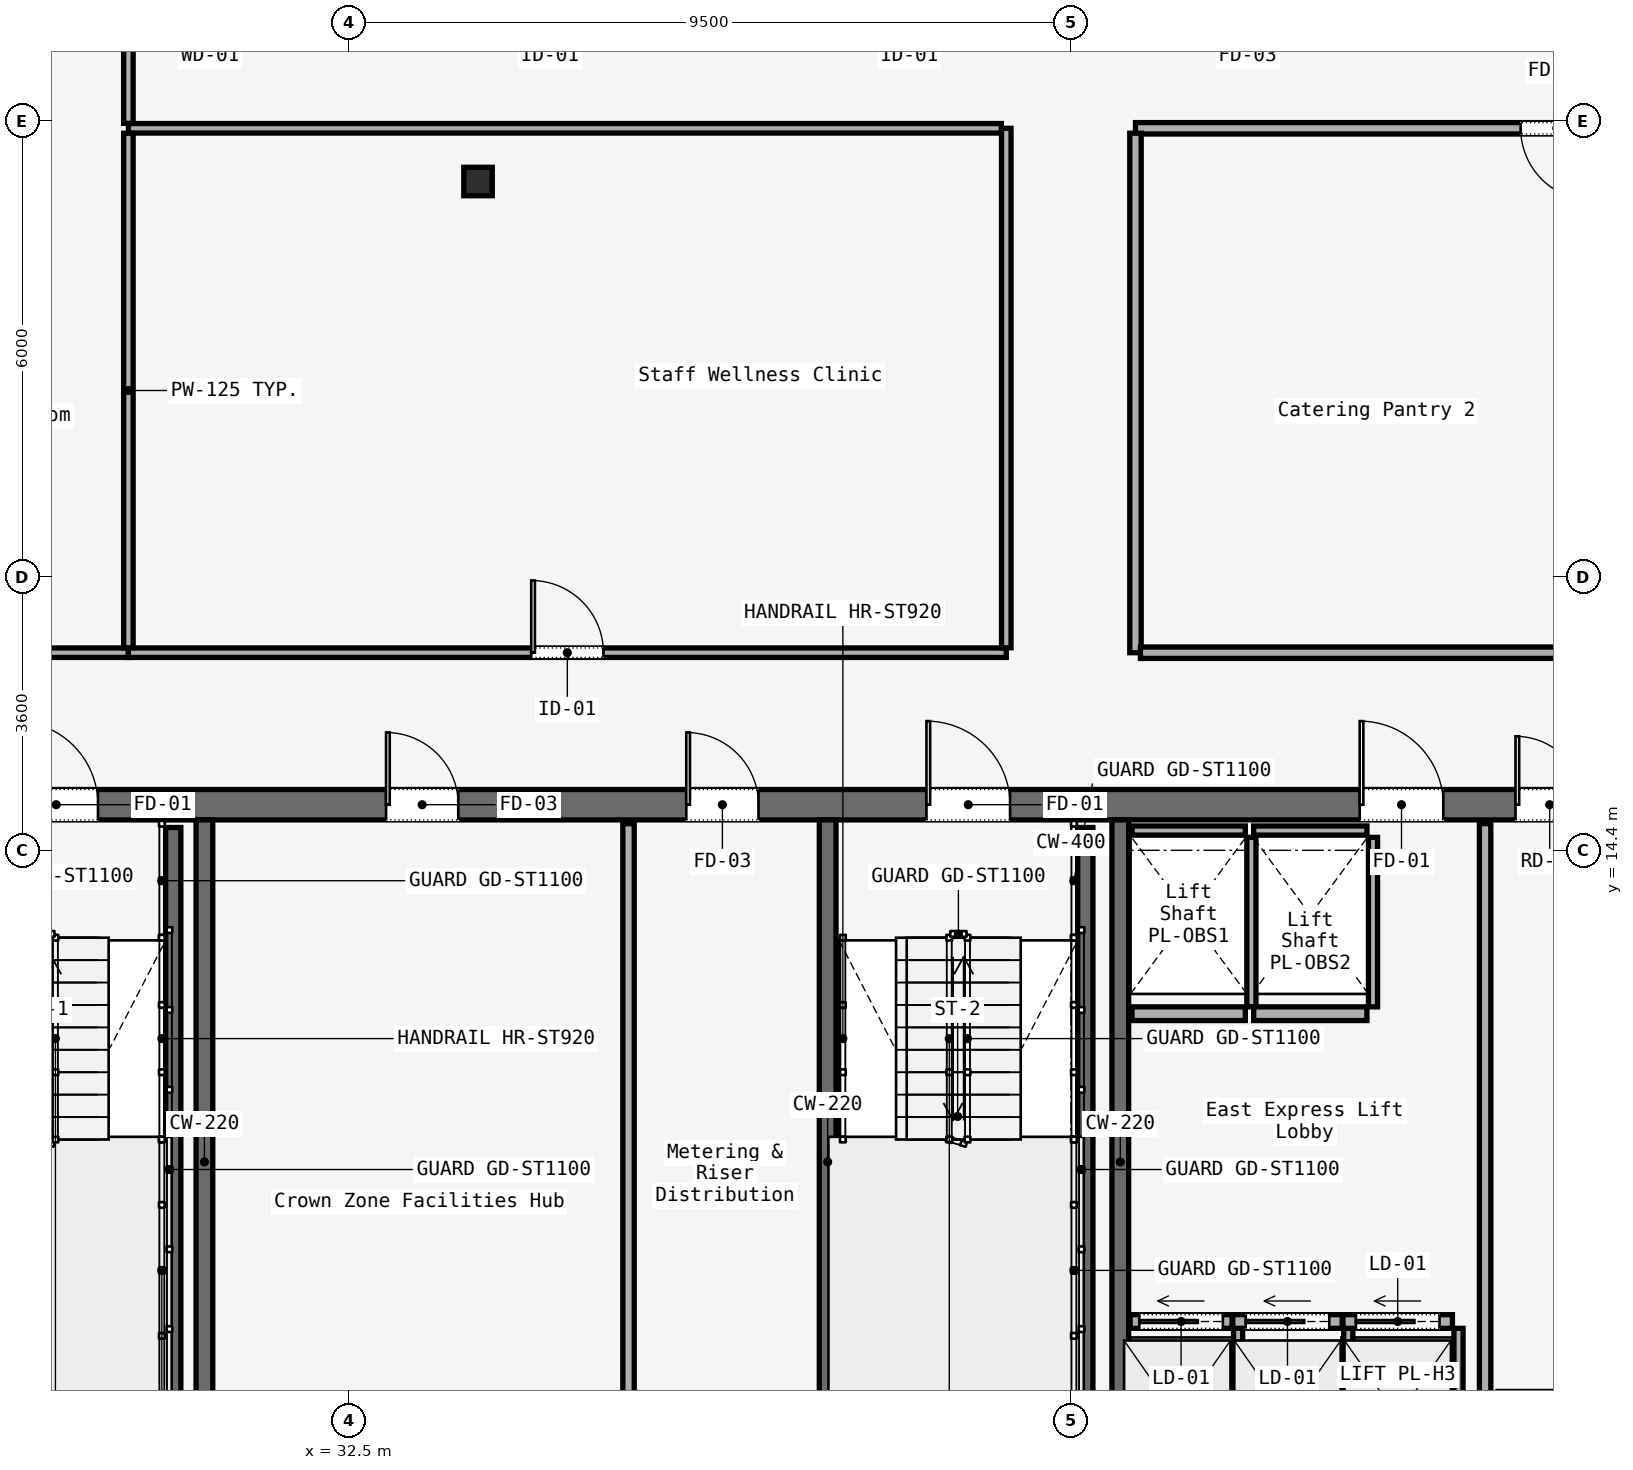
"""IFC4 building model, lengths in metres.
Left out: names, types, materials, properties, quantities, classifications, styles, units other than length and angle.
Written with IfcOpenShell. Run it as: python <this file> out.ifc"""

import sys

from ifc_helpers import new_model, si_unit, direction, frame, frame_2d, origin, origin_2d, place, context, subcontext, project, spatial, rectangle, i_section, extrude, element, fill, save


model = new_model("IFC4")
c1 = context("Model", 3, precision=1e-05, world=origin(), true_north=direction((0.0, 1.0)))
c2 = subcontext(c1, "Body", "Model", "MODEL_VIEW")
j1 = project(units=[si_unit("LENGTHUNIT", "METRE"), si_unit("PLANEANGLEUNIT", "RADIAN")], contexts=[c1])
p1 = place(None, origin())
s1 = spatial("IfcSite", under=j1, at=p1, CompositionType="ELEMENT")
p2 = place(p1, origin())
s2 = spatial("IfcBuilding", under=s1, at=p2, CompositionType="ELEMENT")
p3 = place(p2, frame((0.0, 0.0, 252.2)))
s3 = spatial("IfcBuildingStorey", under=s2, at=p3, CompositionType="ELEMENT", Elevation=252.2)
p4 = place(p3, frame((26.45, 15.0, 0.0), z_axis=(0.0, 0.0, 1.0), x_axis=(1.0, 0.0, 0.0)))
e1 = element("IfcWall", 1, at=p4, inside=s3, PredefinedType="SOLIDWALL", context=c2, shape_type="SweptSolid", body=[
    extrude(rectangle(XDim=31.1, YDim=0.4, at=frame_2d((15.55, 0.0))), origin(), (0.0, 0.0, 1.0), 3.58),
])
p5 = place(p4, frame((1.65, 0.0, 0.0)))
e2 = element("IfcOpeningElement", 2, at=p5, cuts=e1, PredefinedType="OPENING", context=c2, shape_type="SweptSolid", body=[
    extrude(rectangle(XDim=1.1, YDim=2.2, at=frame_2d((0.55, 1.1))), frame((0.0, 0.2, 0.0), z_axis=(0.0, -1.0, 0.0), x_axis=(1.0, 0.0, 0.0)), (0.0, 0.0, 1.0), 0.4),
])
p6 = place(p4, frame((13.65, 0.0, 0.0)))
e3 = element("IfcOpeningElement", 3, at=p6, cuts=e1, PredefinedType="OPENING", context=c2, shape_type="SweptSolid", body=[
    extrude(rectangle(XDim=1.1, YDim=2.2, at=frame_2d((0.55, 1.1))), frame((0.0, 0.2, 0.0), z_axis=(0.0, -1.0, 0.0), x_axis=(1.0, 0.0, 0.0)), (0.0, 0.0, 1.0), 0.4),
])
p7 = place(p4, frame((25.55, 0.0, 0.0)))
e4 = element("IfcOpeningElement", 4, at=p7, cuts=e1, PredefinedType="OPENING", context=c2, shape_type="SweptSolid", body=[
    extrude(rectangle(XDim=1.1, YDim=2.2, at=frame_2d((0.55, 1.1))), frame((0.0, 0.2, 0.0), z_axis=(0.0, -1.0, 0.0), x_axis=(1.0, 0.0, 0.0)), (0.0, 0.0, 1.0), 0.4),
])
p8 = place(p4, frame((19.35, 0.0, 0.0)))
e5 = element("IfcOpeningElement", 5, at=p8, cuts=e1, PredefinedType="OPENING", context=c2, shape_type="SweptSolid", body=[
    extrude(rectangle(XDim=1.1, YDim=2.2, at=frame_2d((0.55, 1.1))), frame((0.0, 0.2, 0.0), z_axis=(0.0, -1.0, 0.0), x_axis=(1.0, 0.0, 0.0)), (0.0, 0.0, 1.0), 0.4),
])
p9 = place(p4, frame((21.4, 0.0, 0.0)))
e6 = element("IfcOpeningElement", 6, at=p9, cuts=e1, PredefinedType="OPENING", context=c2, shape_type="SweptSolid", body=[
    extrude(rectangle(XDim=0.9, YDim=2.1, at=frame_2d((0.45, 1.05))), frame((0.0, 0.2, 0.0), z_axis=(0.0, -1.0, 0.0), x_axis=(1.0, 0.0, 0.0)), (0.0, 0.0, 1.0), 0.4),
])
p10 = place(p4, frame((6.54, 0.0, 0.0)))
e7 = element("IfcOpeningElement", 7, at=p10, cuts=e1, PredefinedType="OPENING", context=c2, shape_type="SweptSolid", body=[
    extrude(rectangle(XDim=0.95, YDim=2.2, at=frame_2d((0.475, 1.1))), frame((0.0, 0.2, 0.0), z_axis=(0.0, -1.0, 0.0), x_axis=(1.0, 0.0, 0.0)), (0.0, 0.0, 1.0), 0.4),
])
p11 = place(p4, frame((10.49, 0.0, 0.0)))
e8 = element("IfcOpeningElement", 8, at=p11, cuts=e1, PredefinedType="OPENING", context=c2, shape_type="SweptSolid", body=[
    extrude(rectangle(XDim=0.95, YDim=2.2, at=frame_2d((0.475, 1.1))), frame((0.0, 0.2, 0.0), z_axis=(0.0, -1.0, 0.0), x_axis=(1.0, 0.0, 0.0)), (0.0, 0.0, 1.0), 0.4),
])
p12 = place(p4, frame((23.35, 0.0, 0.0)))
e9 = element("IfcOpeningElement", 9, at=p12, cuts=e1, PredefinedType="OPENING", context=c2, shape_type="SweptSolid", body=[
    extrude(rectangle(XDim=1.3, YDim=2.3, at=frame_2d((0.65, 1.15))), frame((0.0, 0.2, 0.0), z_axis=(0.0, -1.0, 0.0), x_axis=(1.0, 0.0, 0.0)), (0.0, 0.0, 1.0), 0.4),
])
for number, where, z_axis, x_axis in (
    (10, (30.6, 5.8, 0.0), (0.0, 0.0, 1.0), (0.0, 1.0, 0.0)),
    (11, (38.8, 5.8, 0.0), (0.0, 0.0, 1.0), (0.0, 1.0, 0.0)),
    (12, (42.65, 5.8, 0.0), (0.0, 0.0, 1.0), (0.0, 1.0, 0.0)),
):
    element("IfcWall", number, at=place(p3, frame(where, z_axis=z_axis, x_axis=x_axis)), inside=s3, PredefinedType="SOLIDWALL", context=c2, shape_type="SweptSolid", body=[
        extrude(rectangle(XDim=9.0, YDim=0.22, at=frame_2d((4.5, 0.0))), origin(), (0.0, 0.0, 1.0), 3.58),
    ])
p13 = place(p3, frame((34.2, 23.2, 0.0), z_axis=(0.0, 0.0, 1.0), x_axis=(1.0, 0.0, 0.0)))
e13 = element("IfcColumn", 13, at=p13, inside=s3, PredefinedType="COLUMN", context=c2, shape_type="SweptSolid", body=[
    extrude(i_section(OverallWidth=0.375, OverallDepth=0.375, WebThickness=0.017, FlangeThickness=0.027, FilletRadius=0.015, at=origin_2d()), origin(), (0.0, 0.0, 1.0), 3.58),
])
for number, where, z_axis, x_axis in (
    (14, (30.19, 14.7, 0.0), (0.0, 0.0, 1.0), (0.0, -1.0, 0.0)),
    (15, (42.19, 14.7, 0.0), (0.0, 0.0, 1.0), (0.0, -1.0, 0.0)),
):
    element("IfcWall", number, at=place(p3, frame(where, z_axis=z_axis, x_axis=x_axis)), inside=s3, PredefinedType="SOLIDWALL", context=c2, shape_type="SweptSolid", body=[
        extrude(rectangle(XDim=7.65, YDim=0.2, at=frame_2d((3.825, 0.0))), origin(), (0.0, 0.0, 1.0), 3.8),
    ])
for number, where, z_axis, x_axis in (
    (16, (47.45, 5.9, 0.0), (0.0, 0.0, 1.0), (0.0, 1.0, 0.0)),
    (17, (36.18, 5.9, 0.0), (0.0, 0.0, 1.0), (0.0, 1.0, 0.0)),
):
    element("IfcWall", number, at=place(p3, frame(where, z_axis=z_axis, x_axis=x_axis)), inside=s3, PredefinedType="PARTITIONING", context=c2, shape_type="SweptSolid", body=[
        extrude(rectangle(XDim=8.85, YDim=0.15, at=frame_2d((4.425, 0.0))), origin(), (0.0, 0.0, 1.0), 3.01),
    ])
p14 = place(p3, frame((42.78, 8.2, 0.0), z_axis=(0.0, 0.0, 1.0), x_axis=(1.0, 0.0, 0.0)))
e18 = element("IfcWall", 18, at=p14, inside=s3, PredefinedType="SOLIDWALL", context=c2, shape_type="SweptSolid", body=[
    extrude(rectangle(XDim=1.34, YDim=0.18, at=frame_2d((0.67, 0.0))), origin(), (0.0, 0.0, 1.0), 3.01),
])
p15 = place(p14, frame((0.12, 0.0, 0.0)))
e19 = element("IfcOpeningElement", 19, at=p15, cuts=e18, PredefinedType="OPENING", context=c2, shape_type="SweptSolid", body=[
    extrude(rectangle(XDim=1.1, YDim=2.2, at=frame_2d((0.55, 1.1))), frame((0.0, 0.09, 0.0), z_axis=(0.0, -1.0, 0.0), x_axis=(1.0, 0.0, 0.0)), (0.0, 0.0, 1.0), 0.18),
])
p16 = place(p3, frame((44.2, 5.93, 0.0), z_axis=(0.0, 0.0, 1.0), x_axis=(0.0, 1.0, 0.0)))
e20 = element("IfcWall", 20, at=p16, inside=s3, PredefinedType="SOLIDWALL", context=c2, shape_type="SweptSolid", body=[
    extrude(rectangle(XDim=2.18, YDim=0.12, at=frame_2d((1.09, 0.0))), origin(), (0.0, 0.0, 1.0), 3.01),
])
p17 = place(p3, frame((44.13, 8.2, 0.0), z_axis=(0.0, 0.0, 1.0), x_axis=(1.0, 0.0, 0.0)))
e21 = element("IfcWall", 21, at=p17, inside=s3, PredefinedType="SOLIDWALL", context=c2, shape_type="SweptSolid", body=[
    extrude(rectangle(XDim=1.44, YDim=0.18, at=frame_2d((0.72, 0.0))), origin(), (0.0, 0.0, 1.0), 3.01),
])
p18 = place(p17, frame((0.17, 0.0, 0.0)))
e22 = element("IfcOpeningElement", 22, at=p18, cuts=e21, PredefinedType="OPENING", context=c2, shape_type="SweptSolid", body=[
    extrude(rectangle(XDim=1.1, YDim=2.2, at=frame_2d((0.55, 1.1))), frame((0.0, 0.09, 0.0), z_axis=(0.0, -1.0, 0.0), x_axis=(1.0, 0.0, 0.0)), (0.0, 0.0, 1.0), 0.18),
])
p19 = place(p3, frame((45.65, 5.93, 0.0), z_axis=(0.0, 0.0, 1.0), x_axis=(0.0, 1.0, 0.0)))
e23 = element("IfcWall", 23, at=p19, inside=s3, PredefinedType="SOLIDWALL", context=c2, shape_type="SweptSolid", body=[
    extrude(rectangle(XDim=2.18, YDim=0.12, at=frame_2d((1.09, 0.0))), origin(), (0.0, 0.0, 1.0), 3.01),
])
p20 = place(p3, frame((45.58, 8.2, 0.0), z_axis=(0.0, 0.0, 1.0), x_axis=(1.0, 0.0, 0.0)))
e24 = element("IfcWall", 24, at=p20, inside=s3, PredefinedType="SOLIDWALL", context=c2, shape_type="SweptSolid", body=[
    extrude(rectangle(XDim=1.44, YDim=0.18, at=frame_2d((0.72, 0.0))), origin(), (0.0, 0.0, 1.0), 3.01),
])
p21 = place(p20, frame((0.17, 0.0, 0.0)))
e25 = element("IfcOpeningElement", 25, at=p21, cuts=e24, PredefinedType="OPENING", context=c2, shape_type="SweptSolid", body=[
    extrude(rectangle(XDim=1.1, YDim=2.2, at=frame_2d((0.55, 1.1))), frame((0.0, 0.09, 0.0), z_axis=(0.0, -1.0, 0.0), x_axis=(1.0, 0.0, 0.0)), (0.0, 0.0, 1.0), 0.18),
])
p22 = place(p3, frame((47.1, 5.93, 0.0), z_axis=(0.0, 0.0, 1.0), x_axis=(0.0, 1.0, 0.0)))
e26 = element("IfcWall", 26, at=p22, inside=s3, PredefinedType="SOLIDWALL", context=c2, shape_type="SweptSolid", body=[
    extrude(rectangle(XDim=2.18, YDim=0.12, at=frame_2d((1.09, 0.0))), origin(), (0.0, 0.0, 1.0), 3.01),
])
p23 = place(p3, frame((42.805, 12.25, 0.0), z_axis=(0.0, 0.0, 1.0), x_axis=(1.0, 0.0, 0.0)))
e27 = element("IfcWall", 27, at=p23, inside=s3, PredefinedType="SOLIDWALL", context=c2, shape_type="SweptSolid", body=[
    extrude(rectangle(XDim=1.49, YDim=0.18, at=frame_2d((0.745, 0.0))), origin(), (0.0, 0.0, 1.0), 3.01),
])
p24 = place(p3, frame((42.805, 14.66, 0.0), z_axis=(0.0, 0.0, 1.0), x_axis=(1.0, 0.0, 0.0)))
e28 = element("IfcWall", 28, at=p24, inside=s3, PredefinedType="SOLIDWALL", context=c2, shape_type="SweptSolid", body=[
    extrude(rectangle(XDim=1.49, YDim=0.12, at=frame_2d((0.745, 0.0))), origin(), (0.0, 0.0, 1.0), 3.01),
])
p25 = place(p3, frame((44.375, 12.34, 0.0), z_axis=(0.0, 0.0, 1.0), x_axis=(0.0, 1.0, 0.0)))
e29 = element("IfcWall", 29, at=p25, inside=s3, PredefinedType="SOLIDWALL", context=c2, shape_type="SweptSolid", body=[
    extrude(rectangle(XDim=2.23, YDim=0.12, at=frame_2d((1.115, 0.0))), origin(), (0.0, 0.0, 1.0), 3.01),
])
p26 = place(p3, frame((44.405, 12.25, 0.0), z_axis=(0.0, 0.0, 1.0), x_axis=(1.0, 0.0, 0.0)))
e30 = element("IfcWall", 30, at=p26, inside=s3, PredefinedType="SOLIDWALL", context=c2, shape_type="SweptSolid", body=[
    extrude(rectangle(XDim=1.49, YDim=0.18, at=frame_2d((0.745, 0.0))), origin(), (0.0, 0.0, 1.0), 3.01),
])
p27 = place(p3, frame((44.405, 14.66, 0.0), z_axis=(0.0, 0.0, 1.0), x_axis=(1.0, 0.0, 0.0)))
e31 = element("IfcWall", 31, at=p27, inside=s3, PredefinedType="SOLIDWALL", context=c2, shape_type="SweptSolid", body=[
    extrude(rectangle(XDim=1.49, YDim=0.12, at=frame_2d((0.745, 0.0))), origin(), (0.0, 0.0, 1.0), 3.01),
])
p28 = place(p3, frame((45.975, 12.34, 0.0), z_axis=(0.0, 0.0, 1.0), x_axis=(0.0, 1.0, 0.0)))
e32 = element("IfcWall", 32, at=p28, inside=s3, PredefinedType="SOLIDWALL", context=c2, shape_type="SweptSolid", body=[
    extrude(rectangle(XDim=2.23, YDim=0.12, at=frame_2d((1.115, 0.0))), origin(), (0.0, 0.0, 1.0), 3.01),
])
p29 = place(p3, frame((23.38, 17.0, 0.0), z_axis=(0.0, 0.0, 1.0), x_axis=(1.0, 0.0, 0.0)))
e33 = element("IfcWall", 33, at=p29, inside=s3, PredefinedType="PARTITIONING", context=c2, shape_type="SweptSolid", body=[
    extrude(rectangle(XDim=6.22, YDim=0.125, at=frame_2d((3.11, 0.0))), origin(), (0.0, 0.0, 1.0), 3.01),
])
p30 = place(p29, frame((2.41, 0.0, 0.0)))
e34 = element("IfcOpeningElement", 34, at=p30, cuts=e33, PredefinedType="OPENING", context=c2, shape_type="SweptSolid", body=[
    extrude(rectangle(XDim=1.4, YDim=2.2, at=frame_2d((0.7, 1.1))), frame((0.0, 0.062, 0.0), z_axis=(0.0, -1.0, 0.0), x_axis=(1.0, 0.0, 0.0)), (0.0, 0.0, 1.0), 0.125),
])
p31 = place(p3, frame((29.6, 17.0, 0.0), z_axis=(0.0, 0.0, 1.0), x_axis=(1.0, 0.0, 0.0)))
e35 = element("IfcWall", 35, at=p31, inside=s3, PredefinedType="PARTITIONING", context=c2, shape_type="SweptSolid", body=[
    extrude(rectangle(XDim=11.55, YDim=0.125, at=frame_2d((5.775, 0.0))), origin(), (0.0, 0.0, 1.0), 3.01),
])
p32 = place(p31, frame((5.3, 0.0, 0.0)))
e36 = element("IfcOpeningElement", 36, at=p32, cuts=e35, PredefinedType="OPENING", context=c2, shape_type="SweptSolid", body=[
    extrude(rectangle(XDim=0.95, YDim=2.2, at=frame_2d((0.475, 1.1))), frame((0.0, 0.062, 0.0), z_axis=(0.0, -1.0, 0.0), x_axis=(1.0, 0.0, 0.0)), (0.0, 0.0, 1.0), 0.125),
])
p33 = place(p3, frame((41.15, 17.065, 0.0), z_axis=(0.0, 0.0, 1.0), x_axis=(0.0, 1.0, 0.0)))
e37 = element("IfcWall", 37, at=p33, inside=s3, PredefinedType="PARTITIONING", context=c2, shape_type="SweptSolid", body=[
    extrude(rectangle(XDim=6.835, YDim=0.125, at=frame_2d((3.417, 0.0))), origin(), (0.0, 0.0, 1.0), 3.01),
])
p34 = place(p3, frame((41.085, 23.9, 0.0), z_axis=(0.0, 0.0, 1.0), x_axis=(-1.0, 0.0, 0.0)))
e38 = element("IfcWall", 38, at=p34, inside=s3, PredefinedType="PARTITIONING", context=c2, shape_type="SweptSolid", body=[
    extrude(rectangle(XDim=11.485, YDim=0.125, at=frame_2d((5.742, 0.0))), origin(), (0.0, 0.0, 1.0), 3.01),
])
p35 = place(p3, frame((29.6, 23.965, 0.0), z_axis=(0.0, 0.0, 1.0), x_axis=(0.0, 1.0, 0.0)))
e39 = element("IfcWall", 39, at=p35, inside=s3, PredefinedType="PARTITIONING", context=c2, shape_type="SweptSolid", body=[
    extrude(rectangle(XDim=1.635, YDim=0.125, at=frame_2d((0.817, 0.0))), origin(), (0.0, 0.0, 1.0), 3.01),
])
p36 = place(p3, frame((53.935, 23.9, 0.0), z_axis=(0.0, 0.0, 1.0), x_axis=(-1.0, 0.0, 0.0)))
e40 = element("IfcWall", 40, at=p36, inside=s3, PredefinedType="PARTITIONING", context=c2, shape_type="SweptSolid", body=[
    extrude(rectangle(XDim=11.085, YDim=0.15, at=frame_2d((5.542, 0.0))), origin(), (0.0, 0.0, 1.0), 3.01),
])
p37 = place(p36, frame((5.067, 0.0, 0.0)))
e41 = element("IfcOpeningElement", 41, at=p37, cuts=e40, PredefinedType="OPENING", context=c2, shape_type="SweptSolid", body=[
    extrude(rectangle(XDim=0.95, YDim=2.2, at=frame_2d((0.475, 1.1))), frame((0.0, 0.075, 0.0), z_axis=(0.0, -1.0, 0.0), x_axis=(1.0, 0.0, 0.0)), (0.0, 0.0, 1.0), 0.15),
])
p38 = place(p3, frame((42.85, 23.835, 0.0), z_axis=(0.0, 0.0, 1.0), x_axis=(0.0, -1.0, 0.0)))
e42 = element("IfcWall", 42, at=p38, inside=s3, PredefinedType="PARTITIONING", context=c2, shape_type="SweptSolid", body=[
    extrude(rectangle(XDim=6.835, YDim=0.15, at=frame_2d((3.417, 0.0))), origin(), (0.0, 0.0, 1.0), 3.01),
])
p39 = place(p3, frame((42.915, 17.0, 0.0), z_axis=(0.0, 0.0, 1.0), x_axis=(1.0, 0.0, 0.0)))
e43 = element("IfcWall", 43, at=p39, inside=s3, PredefinedType="PARTITIONING", context=c2, shape_type="SweptSolid", body=[
    extrude(rectangle(XDim=11.085, YDim=0.15, at=frame_2d((5.542, 0.0))), origin(), (0.0, 0.0, 1.0), 3.01),
])
p40 = place(p3, frame((29.6, 23.835, 0.0), z_axis=(0.0, 0.0, 1.0), x_axis=(0.0, -1.0, 0.0)))
e44 = element("IfcWall", 44, at=p40, inside=s3, PredefinedType="PARTITIONING", context=c2, shape_type="SweptSolid", body=[
    extrude(rectangle(XDim=6.77, YDim=0.125, at=frame_2d((3.385, 0.0))), origin(), (0.0, 0.0, 1.0), 3.01),
])
p41 = place(p5, origin())
e45 = element("IfcDoor", 45, at=p41, inside=s3, OperationType="SINGLE_SWING_RIGHT", PredefinedType="DOOR", context=c2, shape_type="SweptSolid", body=[
    extrude(rectangle(XDim=1.1, YDim=2.2, at=frame_2d((0.55, 1.1))), frame((0.0, 0.025, 0.0), z_axis=(0.0, -1.0, 0.0), x_axis=(1.0, 0.0, 0.0)), (0.0, 0.0, 1.0), 0.05),
])
fill(e2, e45)
p42 = place(p6, origin())
e46 = element("IfcDoor", 46, at=p42, inside=s3, OperationType="SINGLE_SWING_LEFT", PredefinedType="DOOR", context=c2, shape_type="SweptSolid", body=[
    extrude(rectangle(XDim=1.1, YDim=2.2, at=frame_2d((0.55, 1.1))), frame((0.0, 0.025, 0.0), z_axis=(0.0, -1.0, 0.0), x_axis=(1.0, 0.0, 0.0)), (0.0, 0.0, 1.0), 0.05),
])
fill(e3, e46)
p43 = place(p8, origin())
e47 = element("IfcDoor", 47, at=p43, inside=s3, OperationType="SINGLE_SWING_LEFT", PredefinedType="DOOR", context=c2, shape_type="SweptSolid", body=[
    extrude(rectangle(XDim=1.1, YDim=2.2, at=frame_2d((0.55, 1.1))), frame((0.0, 0.025, 0.0), z_axis=(0.0, -1.0, 0.0), x_axis=(1.0, 0.0, 0.0)), (0.0, 0.0, 1.0), 0.05),
])
fill(e5, e47)
p44 = place(p9, origin())
e48 = element("IfcDoor", 48, at=p44, inside=s3, OperationType="SINGLE_SWING_LEFT", PredefinedType="DOOR", context=c2, shape_type="SweptSolid", body=[
    extrude(rectangle(XDim=0.9, YDim=2.1, at=frame_2d((0.45, 1.05))), frame((0.0, 0.025, 0.0), z_axis=(0.0, -1.0, 0.0), x_axis=(1.0, 0.0, 0.0)), (0.0, 0.0, 1.0), 0.05),
])
fill(e6, e48)
p45 = place(p10, origin())
e49 = element("IfcDoor", 49, at=p45, inside=s3, OperationType="SINGLE_SWING_LEFT", PredefinedType="DOOR", context=c2, shape_type="SweptSolid", body=[
    extrude(rectangle(XDim=0.95, YDim=2.2, at=frame_2d((0.475, 1.1))), frame((0.0, 0.025, 0.0), z_axis=(0.0, -1.0, 0.0), x_axis=(1.0, 0.0, 0.0)), (0.0, 0.0, 1.0), 0.05),
])
fill(e7, e49)
p46 = place(p11, origin())
e50 = element("IfcDoor", 50, at=p46, inside=s3, OperationType="SINGLE_SWING_RIGHT", PredefinedType="DOOR", context=c2, shape_type="SweptSolid", body=[
    extrude(rectangle(XDim=0.95, YDim=2.2, at=frame_2d((0.475, 1.1))), frame((0.0, 0.025, 0.0), z_axis=(0.0, -1.0, 0.0), x_axis=(1.0, 0.0, 0.0)), (0.0, 0.0, 1.0), 0.05),
])
fill(e8, e50)
p47 = place(p15, origin())
e51 = element("IfcDoor", 51, at=p47, inside=s3, OperationType="SLIDING_TO_LEFT", PredefinedType="DOOR", context=c2, shape_type="SweptSolid", body=[
    extrude(rectangle(XDim=1.1, YDim=2.2, at=frame_2d((0.55, 1.1))), frame((0.0, 0.025, 0.0), z_axis=(0.0, -1.0, 0.0), x_axis=(1.0, 0.0, 0.0)), (0.0, 0.0, 1.0), 0.05),
])
fill(e19, e51)
p48 = place(p18, origin())
e52 = element("IfcDoor", 52, at=p48, inside=s3, OperationType="SLIDING_TO_LEFT", PredefinedType="DOOR", context=c2, shape_type="SweptSolid", body=[
    extrude(rectangle(XDim=1.1, YDim=2.2, at=frame_2d((0.55, 1.1))), frame((0.0, 0.025, 0.0), z_axis=(0.0, -1.0, 0.0), x_axis=(1.0, 0.0, 0.0)), (0.0, 0.0, 1.0), 0.05),
])
fill(e22, e52)
p49 = place(p21, origin())
e53 = element("IfcDoor", 53, at=p49, inside=s3, OperationType="SLIDING_TO_LEFT", PredefinedType="DOOR", context=c2, shape_type="SweptSolid", body=[
    extrude(rectangle(XDim=1.1, YDim=2.2, at=frame_2d((0.55, 1.1))), frame((0.0, 0.025, 0.0), z_axis=(0.0, -1.0, 0.0), x_axis=(1.0, 0.0, 0.0)), (0.0, 0.0, 1.0), 0.05),
])
fill(e25, e53)
p50 = place(p32, origin())
e54 = element("IfcDoor", 54, at=p50, inside=s3, OperationType="SINGLE_SWING_LEFT", PredefinedType="DOOR", context=c2, shape_type="SweptSolid", body=[
    extrude(rectangle(XDim=0.95, YDim=2.2, at=frame_2d((0.475, 1.1))), frame((0.0, 0.025, 0.0), z_axis=(0.0, -1.0, 0.0), x_axis=(1.0, 0.0, 0.0)), (0.0, 0.0, 1.0), 0.05),
])
fill(e36, e54)
p51 = place(p37, origin())
e55 = element("IfcDoor", 55, at=p51, inside=s3, OperationType="SINGLE_SWING_RIGHT", PredefinedType="DOOR", context=c2, shape_type="SweptSolid", body=[
    extrude(rectangle(XDim=0.95, YDim=2.2, at=frame_2d((0.475, 1.1))), frame((0.0, 0.025, 0.0), z_axis=(0.0, -1.0, 0.0), x_axis=(1.0, 0.0, 0.0)), (0.0, 0.0, 1.0), 0.05),
])
fill(e41, e55)
save(model, sys.argv[1])
